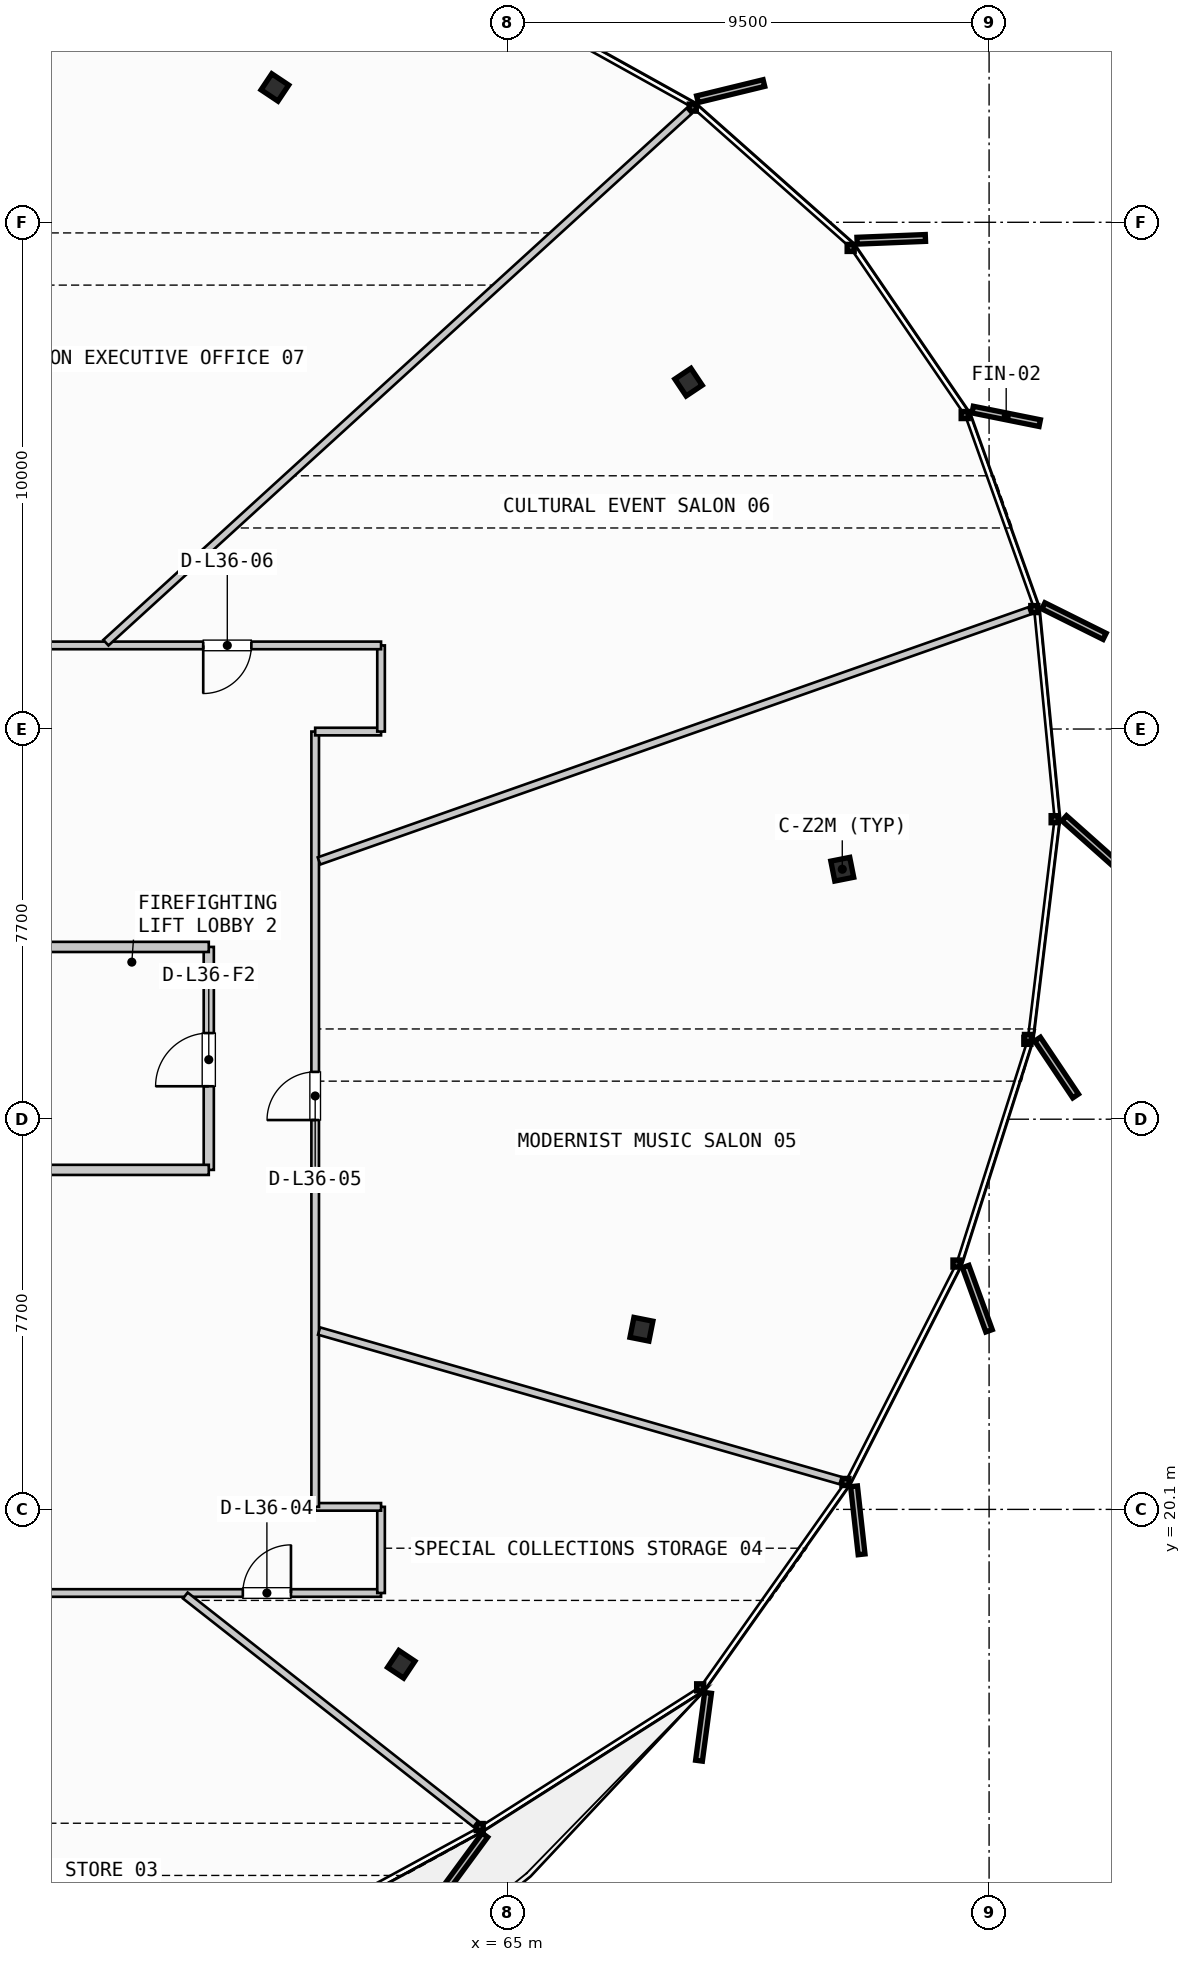
"""IFC4 building model, lengths in metres.
Left out: names, types, materials, properties, quantities, classifications, styles, units other than length and angle.
Written with IfcOpenShell. Run it as: python <this file> out.ifc"""

import sys

from ifc_helpers import new_model, si_unit, direction, frame, frame_2d, origin, origin_2d, place, context, subcontext, project, spatial, rectangle, i_section, extrude, source, transform, mapped, element, fill, save


model = new_model("IFC4")
c1 = context("Model", 3, precision=1e-05, world=origin(), true_north=direction((0.0, 1.0)))
c2 = subcontext(c1, "Body", "Model", "MODEL_VIEW")
j1 = project(units=[si_unit("LENGTHUNIT", "METRE"), si_unit("PLANEANGLEUNIT", "RADIAN")], contexts=[c1])
p1 = place(None, origin())
s1 = spatial("IfcSite", under=j1, at=p1, CompositionType="ELEMENT")
p2 = place(p1, origin())
s2 = spatial("IfcBuilding", under=s1, at=p2, CompositionType="ELEMENT")
p3 = place(p2, frame((0.0, 0.0, 143.0)))
s3 = spatial("IfcBuildingStorey", under=s2, at=p3, CompositionType="ELEMENT", Elevation=143.0)
m1 = source(origin(), c2, "Body", "SweptSolid", [
    extrude(i_section(OverallWidth=0.401, OverallDepth=0.381, WebThickness=0.032, FlangeThickness=0.051, FilletRadius=0.015, at=origin_2d()), origin(), (0.0, 0.0, 1.0), 3.3),
])
for number, where, z_axis, x_axis in (
    (1, (71.603, 32.733, 0.0), (0.0, 0.0, 1.0), (0.981, 0.195, 0.0)),
    (2, (68.569, 42.345, 0.0), (0.0, 0.0, 1.0), (0.831, 0.556, 0.0)),
    (3, (60.405, 48.161, 0.0), (0.0, 0.0, 1.0), (0.556, 0.831, 0.0)),
    (4, (62.899, 17.043, 0.0), (0.0, 0.0, 1.0), (0.831, -0.556, 0.0)),
    (5, (67.639, 23.655, 0.0), (0.0, 0.0, 1.0), (0.981, -0.195, 0.0)),
):
    element("IfcColumn", number, at=place(p3, frame(where, z_axis=z_axis, x_axis=x_axis)), inside=s3, PredefinedType="COLUMN", context=c2, shape_type="MappedRepresentation", body=[
        mapped(m1, transform((0.0, 0.0, 0.0), scale=1.0)),
    ])
p4 = place(p3, frame((59.1, 26.8, 0.0), z_axis=(0.0, 0.0, 1.0), x_axis=(0.0, 1.0, 0.0)))
e6 = element("IfcWall", 6, at=p4, inside=s3, PredefinedType="PARTITIONING", context=c2, shape_type="SweptSolid", body=[
    extrude(rectangle(XDim=4.4, YDim=0.2, at=frame_2d((2.2, 0.0))), origin(), (0.0, 0.0, 1.0), 2.305),
])
p5 = place(p4, frame((1.65, 0.0, 0.0)))
e7 = element("IfcOpeningElement", 7, at=p5, cuts=e6, PredefinedType="OPENING", context=c2, shape_type="SweptSolid", body=[
    extrude(rectangle(XDim=1.05, YDim=2.15, at=frame_2d((0.525, 1.075))), frame((0.0, 0.11, 0.0), z_axis=(0.0, -1.0, 0.0), x_axis=(1.0, 0.0, 0.0)), (0.0, 0.0, 1.0), 0.22),
])
for number, where, z_axis, x_axis in (
    (8, (55.885, 26.8, 0.0), (0.0, 0.0, 1.0), (1.0, 0.0, 0.0)),
    (9, (55.885, 31.2, 0.0), (0.0, 0.0, 1.0), (1.0, 0.0, 0.0)),
):
    element("IfcWall", number, at=place(p3, frame(where, z_axis=z_axis, x_axis=x_axis)), inside=s3, PredefinedType="PARTITIONING", context=c2, shape_type="SweptSolid", body=[
        extrude(rectangle(XDim=3.215, YDim=0.2, at=frame_2d((1.607, 0.0))), origin(), (0.0, 0.0, 1.0), 2.305),
    ])
p6 = place(p3, frame((31.1, 18.45, 0.0), z_axis=(0.0, 0.0, 1.0), x_axis=(1.0, 0.0, 0.0)))
e10 = element("IfcWall", 10, at=p6, inside=s3, PredefinedType="PARTITIONING", context=c2, shape_type="SweptSolid", body=[
    extrude(rectangle(XDim=31.4, YDim=0.15, at=frame_2d((15.7, 0.0))), origin(), (0.0, 0.0, 1.0), 2.305),
])
p7 = place(p6, frame((7.719, 0.0, 0.0)))
e11 = element("IfcOpeningElement", 11, at=p7, cuts=e10, PredefinedType="OPENING", context=c2, shape_type="SweptSolid", body=[
    extrude(rectangle(XDim=0.95, YDim=2.15, at=frame_2d((0.475, 1.075))), frame((0.0, 0.085, 0.0), z_axis=(0.0, -1.0, 0.0), x_axis=(1.0, 0.0, 0.0)), (0.0, 0.0, 1.0), 0.17),
])
p8 = place(p6, frame((12.888, 0.0, 0.0)))
e12 = element("IfcOpeningElement", 12, at=p8, cuts=e10, PredefinedType="OPENING", context=c2, shape_type="SweptSolid", body=[
    extrude(rectangle(XDim=0.95, YDim=2.15, at=frame_2d((0.475, 1.075))), frame((0.0, 0.085, 0.0), z_axis=(0.0, -1.0, 0.0), x_axis=(1.0, 0.0, 0.0)), (0.0, 0.0, 1.0), 0.17),
])
p9 = place(p6, frame((21.415, 0.0, 0.0)))
e13 = element("IfcOpeningElement", 13, at=p9, cuts=e10, PredefinedType="OPENING", context=c2, shape_type="SweptSolid", body=[
    extrude(rectangle(XDim=0.95, YDim=2.15, at=frame_2d((0.475, 1.075))), frame((0.0, 0.085, 0.0), z_axis=(0.0, -1.0, 0.0), x_axis=(1.0, 0.0, 0.0)), (0.0, 0.0, 1.0), 0.17),
])
p10 = place(p6, frame((28.672, 0.0, 0.0)))
e14 = element("IfcOpeningElement", 14, at=p10, cuts=e10, PredefinedType="OPENING", context=c2, shape_type="SweptSolid", body=[
    extrude(rectangle(XDim=0.95, YDim=2.15, at=frame_2d((0.475, 1.075))), frame((0.0, 0.085, 0.0), z_axis=(0.0, -1.0, 0.0), x_axis=(1.0, 0.0, 0.0)), (0.0, 0.0, 1.0), 0.17),
])
p11 = place(p3, frame((62.5, 18.45, 0.0), z_axis=(0.0, 0.0, 1.0), x_axis=(0.0, 1.0, 0.0)))
e15 = element("IfcWall", 15, at=p11, inside=s3, PredefinedType="PARTITIONING", context=c2, shape_type="SweptSolid", body=[
    extrude(rectangle(XDim=1.7, YDim=0.15, at=frame_2d((0.85, 0.0))), origin(), (0.0, 0.0, 1.0), 2.305),
])
p12 = place(p3, frame((62.5, 20.15, 0.0), z_axis=(0.0, 0.0, 1.0), x_axis=(-1.0, 0.0, 0.0)))
e16 = element("IfcWall", 16, at=p12, inside=s3, PredefinedType="PARTITIONING", context=c2, shape_type="SweptSolid", body=[
    extrude(rectangle(XDim=1.3, YDim=0.15, at=frame_2d((0.65, 0.0))), origin(), (0.0, 0.0, 1.0), 2.305),
])
p13 = place(p3, frame((61.2, 20.15, 0.0), z_axis=(0.0, 0.0, 1.0), x_axis=(0.0, 1.0, 0.0)))
e17 = element("IfcWall", 17, at=p13, inside=s3, PredefinedType="PARTITIONING", context=c2, shape_type="SweptSolid", body=[
    extrude(rectangle(XDim=15.3, YDim=0.15, at=frame_2d((7.65, 0.0))), origin(), (0.0, 0.0, 1.0), 2.305),
])
p14 = place(p13, frame((7.634, 0.0, 0.0)))
e18 = element("IfcOpeningElement", 18, at=p14, cuts=e17, PredefinedType="OPENING", context=c2, shape_type="SweptSolid", body=[
    extrude(rectangle(XDim=0.95, YDim=2.15, at=frame_2d((0.475, 1.075))), frame((0.0, 0.085, 0.0), z_axis=(0.0, -1.0, 0.0), x_axis=(1.0, 0.0, 0.0)), (0.0, 0.0, 1.0), 0.17),
])
p15 = place(p3, frame((61.2, 35.45, 0.0), z_axis=(0.0, 0.0, 1.0), x_axis=(1.0, 0.0, 0.0)))
e19 = element("IfcWall", 19, at=p15, inside=s3, PredefinedType="PARTITIONING", context=c2, shape_type="SweptSolid", body=[
    extrude(rectangle(XDim=1.3, YDim=0.15, at=frame_2d((0.65, 0.0))), origin(), (0.0, 0.0, 1.0), 2.305),
])
p16 = place(p3, frame((62.5, 35.45, 0.0), z_axis=(0.0, 0.0, 1.0), x_axis=(0.0, 1.0, 0.0)))
e20 = element("IfcWall", 20, at=p16, inside=s3, PredefinedType="PARTITIONING", context=c2, shape_type="SweptSolid", body=[
    extrude(rectangle(XDim=1.7, YDim=0.15, at=frame_2d((0.85, 0.0))), origin(), (0.0, 0.0, 1.0), 2.305),
])
p17 = place(p3, frame((62.5, 37.15, 0.0), z_axis=(0.0, 0.0, 1.0), x_axis=(-1.0, 0.0, 0.0)))
e21 = element("IfcWall", 21, at=p17, inside=s3, PredefinedType="PARTITIONING", context=c2, shape_type="SweptSolid", body=[
    extrude(rectangle(XDim=31.4, YDim=0.15, at=frame_2d((15.7, 0.0))), origin(), (0.0, 0.0, 1.0), 2.305),
])
p18 = place(p17, frame((2.56, 0.0, 0.0)))
e22 = element("IfcOpeningElement", 22, at=p18, cuts=e21, PredefinedType="OPENING", context=c2, shape_type="SweptSolid", body=[
    extrude(rectangle(XDim=0.95, YDim=2.15, at=frame_2d((0.475, 1.075))), frame((0.0, 0.085, 0.0), z_axis=(0.0, -1.0, 0.0), x_axis=(1.0, 0.0, 0.0)), (0.0, 0.0, 1.0), 0.17),
])
p19 = place(p17, frame((8.361, 0.0, 0.0)))
e23 = element("IfcOpeningElement", 23, at=p19, cuts=e21, PredefinedType="OPENING", context=c2, shape_type="SweptSolid", body=[
    extrude(rectangle(XDim=0.95, YDim=2.15, at=frame_2d((0.475, 1.075))), frame((0.0, 0.085, 0.0), z_axis=(0.0, -1.0, 0.0), x_axis=(1.0, 0.0, 0.0)), (0.0, 0.0, 1.0), 0.17),
])
p20 = place(p17, frame((14.763, 0.0, 0.0)))
e24 = element("IfcOpeningElement", 24, at=p20, cuts=e21, PredefinedType="OPENING", context=c2, shape_type="SweptSolid", body=[
    extrude(rectangle(XDim=0.95, YDim=2.15, at=frame_2d((0.475, 1.075))), frame((0.0, 0.085, 0.0), z_axis=(0.0, -1.0, 0.0), x_axis=(1.0, 0.0, 0.0)), (0.0, 0.0, 1.0), 0.17),
])
p21 = place(p17, frame((22.302, 0.0, 0.0)))
e25 = element("IfcOpeningElement", 25, at=p21, cuts=e21, PredefinedType="OPENING", context=c2, shape_type="SweptSolid", body=[
    extrude(rectangle(XDim=0.95, YDim=2.15, at=frame_2d((0.475, 1.075))), frame((0.0, 0.085, 0.0), z_axis=(0.0, -1.0, 0.0), x_axis=(1.0, 0.0, 0.0)), (0.0, 0.0, 1.0), 0.17),
])
p22 = place(p3, frame((58.637, 18.401, 0.0), z_axis=(0.0, 0.0, 1.0), x_axis=(0.786094042095, -0.618106913877, 0.0)))
e26 = element("IfcWall", 26, at=p22, inside=s3, PredefinedType="PARTITIONING", context=c2, shape_type="SweptSolid", body=[
    extrude(rectangle(XDim=7.291, YDim=0.15, at=frame_2d((3.646, 0.0))), origin(), (0.0, 0.0, 1.0), 2.305),
])
p23 = place(p3, frame((61.277, 23.62, 0.0), z_axis=(0.0, 0.0, 1.0), x_axis=(0.961271434094, -0.275603392568, 0.0)))
e27 = element("IfcWall", 27, at=p23, inside=s3, PredefinedType="PARTITIONING", context=c2, shape_type="SweptSolid", body=[
    extrude(rectangle(XDim=10.707, YDim=0.15, at=frame_2d((5.354, 0.0))), origin(), (0.0, 0.0, 1.0), 2.305),
])
p24 = place(p3, frame((61.275, 32.897, 0.0), z_axis=(0.0, 0.0, 1.0), x_axis=(0.943252293623, 0.332076964837, 0.0)))
e28 = element("IfcWall", 28, at=p24, inside=s3, PredefinedType="PARTITIONING", context=c2, shape_type="SweptSolid", body=[
    extrude(rectangle(XDim=14.866, YDim=0.15, at=frame_2d((7.433, 0.0))), origin(), (0.0, 0.0, 1.0), 2.305),
])
p25 = place(p3, frame((57.07, 37.204, 0.0), z_axis=(0.0, 0.0, 1.0), x_axis=(0.738993722189, 0.673712311425, 0.0)))
e29 = element("IfcWall", 29, at=p25, inside=s3, PredefinedType="PARTITIONING", context=c2, shape_type="SweptSolid", body=[
    extrude(rectangle(XDim=15.573, YDim=0.15, at=frame_2d((7.786, 0.0))), origin(), (0.0, 0.0, 1.0), 2.305),
])
m2 = source(origin(), c2, "Body", "SweptSolid", [
    extrude(rectangle(XDim=1.05, YDim=2.15, at=frame_2d((0.525, 1.075))), frame((0.0, 0.025, 0.0), z_axis=(0.0, -1.0, 0.0), x_axis=(1.0, 0.0, 0.0)), (0.0, 0.0, 1.0), 0.05),
])
p26 = place(p5, origin())
e30 = element("IfcDoor", 30, at=p26, inside=s3, OperationType="SINGLE_SWING_LEFT", PredefinedType="DOOR", context=c2, shape_type="MappedRepresentation", body=[
    mapped(m2, transform((0.0, 0.0, 0.0), scale=1.0)),
])
fill(e7, e30)
m3 = source(origin(), c2, "Body", "SweptSolid", [
    extrude(rectangle(XDim=0.95, YDim=2.15, at=frame_2d((0.475, 1.075))), frame((0.0, 0.025, 0.0), z_axis=(0.0, -1.0, 0.0), x_axis=(1.0, 0.0, 0.0)), (0.0, 0.0, 1.0), 0.05),
])
p27 = place(p10, origin())
e31 = element("IfcDoor", 31, at=p27, inside=s3, OperationType="SINGLE_SWING_RIGHT", PredefinedType="DOOR", context=c2, shape_type="MappedRepresentation", body=[
    mapped(m3, transform((0.0, 0.0, 0.0), scale=1.0)),
])
fill(e14, e31)
p28 = place(p14, origin())
e32 = element("IfcDoor", 32, at=p28, inside=s3, OperationType="SINGLE_SWING_LEFT", PredefinedType="DOOR", context=c2, shape_type="MappedRepresentation", body=[
    mapped(m3, transform((0.0, 0.0, 0.0), scale=1.0)),
])
fill(e18, e32)
p29 = place(p18, origin())
e33 = element("IfcDoor", 33, at=p29, inside=s3, OperationType="SINGLE_SWING_RIGHT", PredefinedType="DOOR", context=c2, shape_type="MappedRepresentation", body=[
    mapped(m3, transform((0.0, 0.0, 0.0), scale=1.0)),
])
fill(e22, e33)
save(model, sys.argv[1])
